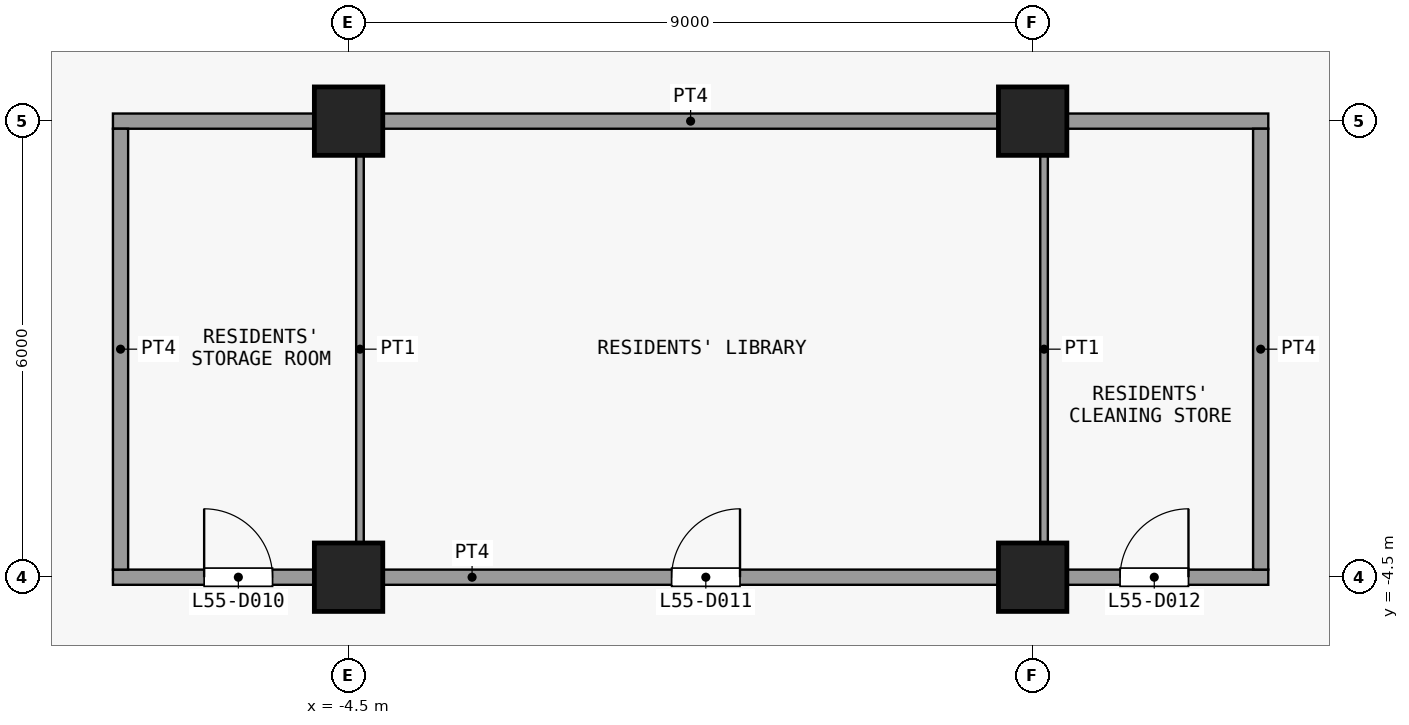
"""IFC4 building model, lengths in metres.
Left out: names, types, materials, properties, quantities, classifications, styles, units other than length and angle.
Written with IfcOpenShell. Run it as: python <this file> out.ifc"""

import sys

from ifc_helpers import new_model, si_unit, direction, frame, frame_2d, origin, origin_2d, place, context, subcontext, project, spatial, rectangle, extrude, element, fill, save


model = new_model("IFC4")
c1 = context("Model", 3, precision=1e-05, world=origin(), true_north=direction((0.0, 1.0)))
c2 = subcontext(c1, "Body", "Model", "MODEL_VIEW")
j1 = project(units=[si_unit("LENGTHUNIT", "METRE"), si_unit("PLANEANGLEUNIT", "RADIAN")], contexts=[c1])
p1 = place(None, origin())
s1 = spatial("IfcSite", under=j1, at=p1, CompositionType="ELEMENT")
p2 = place(p1, origin())
s2 = spatial("IfcBuilding", under=s1, at=p2, CompositionType="ELEMENT")
p3 = place(p2, frame((0.0, 0.0, 219.5)))
s3 = spatial("IfcBuildingStorey", under=s2, at=p3, CompositionType="ELEMENT", Elevation=219.5)
for number, where, z_axis, x_axis in (
    (1, (-4.5, -4.5, 0.0), (0.0, 0.0, 1.0), (1.0, 0.0, 0.0)),
    (2, (-4.5, 1.5, 0.0), (0.0, 0.0, 1.0), (1.0, 0.0, 0.0)),
    (3, (4.5, -4.5, 0.0), (0.0, 0.0, 1.0), (1.0, 0.0, 0.0)),
    (4, (4.5, 1.5, 0.0), (0.0, 0.0, 1.0), (1.0, 0.0, 0.0)),
):
    element("IfcColumn", number, at=place(p3, frame(where, z_axis=z_axis, x_axis=x_axis)), inside=s3, PredefinedType="COLUMN", context=c2, shape_type="SweptSolid", body=[
        extrude(rectangle(XDim=0.9, YDim=0.9, at=origin_2d()), origin(), (0.0, 0.0, 1.0), 3.6),
    ])
p4 = place(p3, frame((-7.6, -4.5, 0.0), z_axis=(0.0, 0.0, 1.0), x_axis=(1.0, 0.0, 0.0)))
e5 = element("IfcWall", 5, at=p4, inside=s3, PredefinedType="PARTITIONING", context=c2, shape_type="SweptSolid", body=[
    extrude(rectangle(XDim=15.2, YDim=0.2, at=frame_2d((7.6, 0.0))), origin(), (0.0, 0.0, 1.0), 3.3),
])
p5 = place(p4, frame((1.2, 0.0, 0.0)))
e6 = element("IfcOpeningElement", 6, at=p5, cuts=e5, PredefinedType="OPENING", context=c2, shape_type="SweptSolid", body=[
    extrude(rectangle(XDim=0.9, YDim=2.1, at=frame_2d((0.45, 1.05))), frame((0.0, 0.11, 0.0), z_axis=(0.0, -1.0, 0.0), x_axis=(1.0, 0.0, 0.0)), (0.0, 0.0, 1.0), 0.22),
])
p6 = place(p4, frame((7.35, 0.0, 0.0)))
e7 = element("IfcOpeningElement", 7, at=p6, cuts=e5, PredefinedType="OPENING", context=c2, shape_type="SweptSolid", body=[
    extrude(rectangle(XDim=0.9, YDim=2.1, at=frame_2d((0.45, 1.05))), frame((0.0, 0.11, 0.0), z_axis=(0.0, -1.0, 0.0), x_axis=(1.0, 0.0, 0.0)), (0.0, 0.0, 1.0), 0.22),
])
p7 = place(p4, frame((13.25, 0.0, 0.0)))
e8 = element("IfcOpeningElement", 8, at=p7, cuts=e5, PredefinedType="OPENING", context=c2, shape_type="SweptSolid", body=[
    extrude(rectangle(XDim=0.9, YDim=2.1, at=frame_2d((0.45, 1.05))), frame((0.0, 0.11, 0.0), z_axis=(0.0, -1.0, 0.0), x_axis=(1.0, 0.0, 0.0)), (0.0, 0.0, 1.0), 0.22),
])
p8 = place(p3, frame((-7.6, 1.5, 0.0), z_axis=(0.0, 0.0, 1.0), x_axis=(1.0, 0.0, 0.0)))
e9 = element("IfcWall", 9, at=p8, inside=s3, PredefinedType="PARTITIONING", context=c2, shape_type="SweptSolid", body=[
    extrude(rectangle(XDim=15.2, YDim=0.2, at=frame_2d((7.6, 0.0))), origin(), (0.0, 0.0, 1.0), 3.3),
])
p9 = place(p3, frame((-7.5, -4.4, 0.0), z_axis=(0.0, 0.0, 1.0), x_axis=(0.0, 1.0, 0.0)))
e10 = element("IfcWall", 10, at=p9, inside=s3, PredefinedType="PARTITIONING", context=c2, shape_type="SweptSolid", body=[
    extrude(rectangle(XDim=5.8, YDim=0.2, at=frame_2d((2.9, 0.0))), origin(), (0.0, 0.0, 1.0), 3.3),
])
for number, where, z_axis, x_axis in (
    (11, (-4.35, -4.4, 0.0), (0.0, 0.0, 1.0), (0.0, 1.0, 0.0)),
    (12, (4.65, -4.4, 0.0), (0.0, 0.0, 1.0), (0.0, 1.0, 0.0)),
):
    element("IfcWall", number, at=place(p3, frame(where, z_axis=z_axis, x_axis=x_axis)), inside=s3, PredefinedType="PARTITIONING", context=c2, shape_type="SweptSolid", body=[
        extrude(rectangle(XDim=5.8, YDim=0.1, at=frame_2d((2.9, 0.0))), origin(), (0.0, 0.0, 1.0), 3.3),
    ])
p10 = place(p3, frame((7.5, -4.4, 0.0), z_axis=(0.0, 0.0, 1.0), x_axis=(0.0, 1.0, 0.0)))
e13 = element("IfcWall", 13, at=p10, inside=s3, PredefinedType="PARTITIONING", context=c2, shape_type="SweptSolid", body=[
    extrude(rectangle(XDim=5.8, YDim=0.2, at=frame_2d((2.9, 0.0))), origin(), (0.0, 0.0, 1.0), 3.3),
])
p11 = place(p5, origin())
e14 = element("IfcDoor", 14, at=p11, inside=s3, OperationType="SINGLE_SWING_RIGHT", PredefinedType="DOOR", context=c2, shape_type="SweptSolid", body=[
    extrude(rectangle(XDim=0.9, YDim=2.1, at=frame_2d((0.45, 1.05))), frame((0.0, 0.025, 0.0), z_axis=(0.0, -1.0, 0.0), x_axis=(1.0, 0.0, 0.0)), (0.0, 0.0, 1.0), 0.05),
])
fill(e6, e14)
p12 = place(p6, origin())
e15 = element("IfcDoor", 15, at=p12, inside=s3, OperationType="SINGLE_SWING_LEFT", PredefinedType="DOOR", context=c2, shape_type="SweptSolid", body=[
    extrude(rectangle(XDim=0.9, YDim=2.1, at=frame_2d((0.45, 1.05))), frame((0.0, 0.025, 0.0), z_axis=(0.0, -1.0, 0.0), x_axis=(1.0, 0.0, 0.0)), (0.0, 0.0, 1.0), 0.05),
])
fill(e7, e15)
p13 = place(p7, origin())
e16 = element("IfcDoor", 16, at=p13, inside=s3, OperationType="SINGLE_SWING_LEFT", PredefinedType="DOOR", context=c2, shape_type="SweptSolid", body=[
    extrude(rectangle(XDim=0.9, YDim=2.1, at=frame_2d((0.45, 1.05))), frame((0.0, 0.025, 0.0), z_axis=(0.0, -1.0, 0.0), x_axis=(1.0, 0.0, 0.0)), (0.0, 0.0, 1.0), 0.05),
])
fill(e8, e16)
save(model, sys.argv[1])
